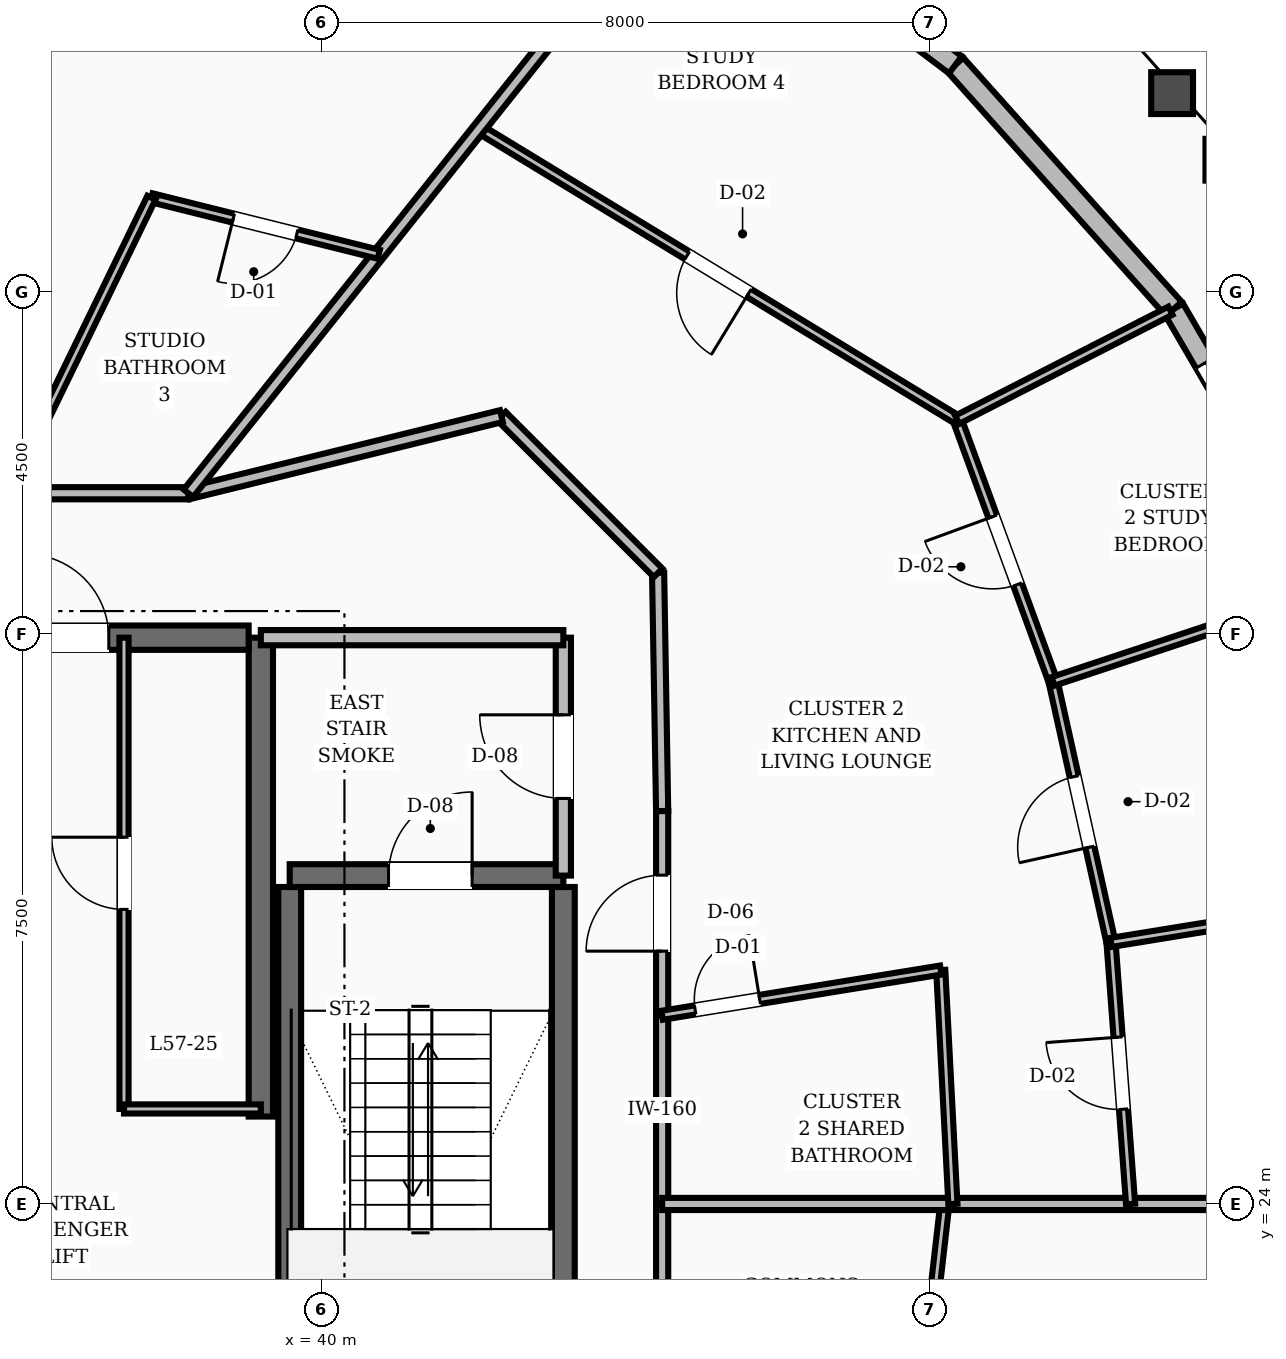
"""IFC4 building model, lengths in metres.
Left out: names, types, materials, properties, quantities, classifications, styles, units other than length and angle.
Written with IfcOpenShell. Run it as: python <this file> out.ifc"""

import sys

from ifc_helpers import new_model, si_unit, direction, frame, frame_2d, origin, place, context, subcontext, project, spatial, rectangle, extrude, element, fill, save


model = new_model("IFC4")
c1 = context("Model", 3, precision=1e-05, world=origin(), true_north=direction((0.0, 1.0)))
c2 = subcontext(c1, "Body", "Model", "MODEL_VIEW")
j1 = project(units=[si_unit("LENGTHUNIT", "METRE"), si_unit("PLANEANGLEUNIT", "RADIAN")], contexts=[c1])
p1 = place(None, origin())
s1 = spatial("IfcSite", under=j1, at=p1, CompositionType="ELEMENT")
p2 = place(p1, origin())
s2 = spatial("IfcBuilding", under=s1, at=p2, CompositionType="ELEMENT")
p3 = place(p2, frame((0.0, 0.0, 222.0)))
s3 = spatial("IfcBuildingStorey", under=s2, at=p3, CompositionType="ELEMENT", Elevation=222.0)
p4 = place(p3, frame((39.2, 25.15, 0.0), z_axis=(0.0, 0.0, 1.0), x_axis=(0.0, 1.0, 0.0)))
e1 = element("IfcWall", 1, at=p4, inside=s3, PredefinedType="SHEAR", context=c2, shape_type="SweptSolid", body=[
    extrude(rectangle(XDim=6.3, YDim=0.32, at=frame_2d((3.15, 0.0))), origin(), (0.0, 0.0, 1.0), 3.6),
])
p5 = place(p3, frame((35.8, 31.45, 0.0), z_axis=(0.0, 0.0, 1.0), x_axis=(1.0, 0.0, 0.0)))
e2 = element("IfcWall", 2, at=p5, inside=s3, PredefinedType="SHEAR", context=c2, shape_type="SweptSolid", body=[
    extrude(rectangle(XDim=3.24, YDim=0.32, at=frame_2d((1.62, 0.0))), origin(), (0.0, 0.0, 1.0), 3.6),
])
p6 = place(p5, frame((0.3, 0.0, 0.0)))
e3 = element("IfcOpeningElement", 3, at=p6, cuts=e2, PredefinedType="OPENING", context=c2, shape_type="SweptSolid", body=[
    extrude(rectangle(XDim=1.1, YDim=2.1, at=frame_2d((0.55, 1.05))), frame((0.0, 0.17, 0.0), z_axis=(0.0, -1.0, 0.0), x_axis=(1.0, 0.0, 0.0)), (0.0, 0.0, 1.0), 0.34),
])
for number, where, z_axis, x_axis in (
    (4, (43.18, 19.43, 0.0), (0.0, 0.0, 1.0), (0.0, 1.0, 0.0)),
    (5, (39.58, 19.43, 0.0), (0.0, 0.0, 1.0), (0.0, 1.0, 0.0)),
):
    element("IfcWall", number, at=place(p3, frame(where, z_axis=z_axis, x_axis=x_axis)), inside=s3, PredefinedType="SHEAR", context=c2, shape_type="SweptSolid", body=[
        extrude(rectangle(XDim=8.74, YDim=0.3, at=frame_2d((4.37, 0.0))), origin(), (0.0, 0.0, 1.0), 3.6),
    ])
p7 = place(p3, frame((39.58, 28.32, 0.0), z_axis=(0.0, 0.0, 1.0), x_axis=(1.0, 0.0, 0.0)))
e6 = element("IfcWall", 6, at=p7, inside=s3, PredefinedType="SHEAR", context=c2, shape_type="SweptSolid", body=[
    extrude(rectangle(XDim=3.6, YDim=0.3, at=frame_2d((1.8, 0.0))), origin(), (0.0, 0.0, 1.0), 3.6),
])
p8 = place(p7, frame((1.3, 0.0, 0.0)))
e7 = element("IfcOpeningElement", 7, at=p8, cuts=e6, PredefinedType="OPENING", context=c2, shape_type="SweptSolid", body=[
    extrude(rectangle(XDim=1.1, YDim=2.1, at=frame_2d((0.55, 1.05))), frame((0.0, 0.16, 0.0), z_axis=(0.0, -1.0, 0.0), x_axis=(1.0, 0.0, 0.0)), (0.0, 0.0, 1.0), 0.32),
])
p9 = place(p3, frame((53.347, 32.111, 0.0), z_axis=(0.0, 0.0, 1.0), x_axis=(-0.503498718903, 0.863995972249, 0.0)))
e8 = element("IfcWall", 8, at=p9, inside=s3, PredefinedType="STANDARD", context=c2, shape_type="SweptSolid", body=[
    extrude(rectangle(XDim=4.241, YDim=0.28, at=frame_2d((2.12, 0.0))), origin(), (0.0, 0.0, 1.0), 2.88),
])
p10 = place(p9, frame((0.821, 0.0, 0.8)))
e9 = element("IfcOpeningElement", 9, at=p10, cuts=e8, PredefinedType="OPENING", context=c2, shape_type="SweptSolid", body=[
    extrude(rectangle(XDim=2.6, YDim=1.65, at=frame_2d((1.3, 0.825))), frame((0.0, 0.15, 0.0), z_axis=(0.0, -1.0, 0.0), x_axis=(1.0, 0.0, 0.0)), (0.0, 0.0, 1.0), 0.3),
])
p11 = place(p3, frame((51.211, 35.775, 0.0), z_axis=(0.0, 0.0, 1.0), x_axis=(-0.666726962521, 0.745302057858, 0.0)))
e10 = element("IfcWall", 10, at=p11, inside=s3, PredefinedType="STANDARD", context=c2, shape_type="SweptSolid", body=[
    extrude(rectangle(XDim=4.31, YDim=0.28, at=frame_2d((2.155, 0.0))), origin(), (0.0, 0.0, 1.0), 2.88),
])
p12 = place(p3, frame((48.338, 38.987, 0.0), z_axis=(0.0, 0.0, 1.0), x_axis=(-0.798942565337, 0.601407330594, 0.0)))
e11 = element("IfcWall", 11, at=p12, inside=s3, PredefinedType="STANDARD", context=c2, shape_type="SweptSolid", body=[
    extrude(rectangle(XDim=4.383, YDim=0.28, at=frame_2d((2.191, 0.0))), origin(), (0.0, 0.0, 1.0), 2.88),
])
p13 = place(p12, frame((0.891, 0.0, 0.8)))
e12 = element("IfcOpeningElement", 12, at=p13, cuts=e11, PredefinedType="OPENING", context=c2, shape_type="SweptSolid", body=[
    extrude(rectangle(XDim=2.6, YDim=1.65, at=frame_2d((1.3, 0.825))), frame((0.0, 0.15, 0.0), z_axis=(0.0, -1.0, 0.0), x_axis=(1.0, 0.0, 0.0)), (0.0, 0.0, 1.0), 0.3),
])
p14 = place(p3, frame((43.18, 28.32, 0.0), z_axis=(0.0, 0.0, 1.0), x_axis=(0.0, 1.0, 0.0)))
e13 = element("IfcWall", 13, at=p14, inside=s3, PredefinedType="SOLIDWALL", context=c2, shape_type="SweptSolid", body=[
    extrude(rectangle(XDim=3.13, YDim=0.2, at=frame_2d((1.565, 0.0))), origin(), (0.0, 0.0, 1.0), 2.87),
])
p15 = place(p14, frame((1.015, 0.0, 0.0)))
e14 = element("IfcOpeningElement", 14, at=p15, cuts=e13, PredefinedType="OPENING", context=c2, shape_type="SweptSolid", body=[
    extrude(rectangle(XDim=1.1, YDim=2.1, at=frame_2d((0.55, 1.05))), frame((0.0, 0.11, 0.0), z_axis=(0.0, -1.0, 0.0), x_axis=(1.0, 0.0, 0.0)), (0.0, 0.0, 1.0), 0.22),
])
p16 = place(p3, frame((39.2, 31.45, 0.0), z_axis=(0.0, 0.0, 1.0), x_axis=(1.0, 0.0, 0.0)))
e15 = element("IfcWall", 15, at=p16, inside=s3, PredefinedType="SOLIDWALL", context=c2, shape_type="SweptSolid", body=[
    extrude(rectangle(XDim=3.98, YDim=0.2, at=frame_2d((1.99, 0.0))), origin(), (0.0, 0.0, 1.0), 2.87),
])
p17 = place(p3, frame((37.4, 25.25, 0.0), z_axis=(0.0, 0.0, 1.0), x_axis=(0.0, 1.0, 0.0)))
e16 = element("IfcWall", 16, at=p17, inside=s3, PredefinedType="PARTITIONING", context=c2, shape_type="SweptSolid", body=[
    extrude(rectangle(XDim=6.2, YDim=0.12, at=frame_2d((3.1, 0.0))), origin(), (0.0, 0.0, 1.0), 2.87),
])
p18 = place(p17, frame((2.625, 0.0, 0.0)))
e17 = element("IfcOpeningElement", 17, at=p18, cuts=e16, PredefinedType="OPENING", context=c2, shape_type="SweptSolid", body=[
    extrude(rectangle(XDim=0.95, YDim=2.1, at=frame_2d((0.475, 1.05))), frame((0.0, 0.07, 0.0), z_axis=(0.0, -1.0, 0.0), x_axis=(1.0, 0.0, 0.0)), (0.0, 0.0, 1.0), 0.14),
])
p19 = place(p3, frame((37.4, 25.25, 0.0), z_axis=(0.0, 0.0, 1.0), x_axis=(1.0, 0.0, 0.0)))
e18 = element("IfcWall", 18, at=p19, inside=s3, PredefinedType="PARTITIONING", context=c2, shape_type="SweptSolid", body=[
    extrude(rectangle(XDim=1.8, YDim=0.12, at=frame_2d((0.9, 0.0))), origin(), (0.0, 0.0, 1.0), 2.87),
])
p20 = place(p3, frame((44.48, 24.0, 0.0), z_axis=(0.0, 0.0, 1.0), x_axis=(0.0, 1.0, 0.0)))
e19 = element("IfcWall", 19, at=p20, inside=s3, PredefinedType="SOLIDWALL", context=c2, shape_type="SweptSolid", body=[
    extrude(rectangle(XDim=2.482, YDim=0.16, at=frame_2d((1.241, 0.0))), origin(), (0.0, 0.0, 1.0), 2.87),
])
p21 = place(p3, frame((44.48, 26.482, 0.0), z_axis=(0.0, 0.0, 1.0), x_axis=(0.0, 1.0, 0.0)))
e20 = element("IfcWall", 20, at=p21, inside=s3, PredefinedType="SOLIDWALL", context=c2, shape_type="SweptSolid", body=[
    extrude(rectangle(XDim=2.687, YDim=0.16, at=frame_2d((1.344, 0.0))), origin(), (0.0, 0.0, 1.0), 2.87),
])
p22 = place(p21, frame((0.844, 0.0, 0.0)))
e21 = element("IfcOpeningElement", 21, at=p22, cuts=e20, PredefinedType="OPENING", context=c2, shape_type="SweptSolid", body=[
    extrude(rectangle(XDim=1.0, YDim=2.1, at=frame_2d((0.5, 1.05))), frame((0.0, 0.09, 0.0), z_axis=(0.0, -1.0, 0.0), x_axis=(1.0, 0.0, 0.0)), (0.0, 0.0, 1.0), 0.18),
])
p23 = place(p3, frame((44.48, 29.169, 0.0), z_axis=(0.0, 0.0, 1.0), x_axis=(-0.016981035134, 0.999855811828, 0.0)))
e22 = element("IfcWall", 22, at=p23, inside=s3, PredefinedType="SOLIDWALL", context=c2, shape_type="SweptSolid", body=[
    extrude(rectangle(XDim=3.134, YDim=0.16, at=frame_2d((1.567, 0.0))), origin(), (0.0, 0.0, 1.0), 2.87),
])
p24 = place(p3, frame((44.427, 32.303, 0.0), z_axis=(0.0, 0.0, 1.0), x_axis=(-0.707106781187, 0.707106781187, 0.0)))
e23 = element("IfcWall", 23, at=p24, inside=s3, PredefinedType="SOLIDWALL", context=c2, shape_type="SweptSolid", body=[
    extrude(rectangle(XDim=2.916, YDim=0.16, at=frame_2d((1.458, 0.0))), origin(), (0.0, 0.0, 1.0), 2.87),
])
p25 = place(p3, frame((42.365, 34.365, 0.0), z_axis=(0.0, 0.0, 1.0), x_axis=(-0.970939799552, -0.239323850978, 0.0)))
e24 = element("IfcWall", 24, at=p25, inside=s3, PredefinedType="SOLIDWALL", context=c2, shape_type="SweptSolid", body=[
    extrude(rectangle(XDim=4.241, YDim=0.16, at=frame_2d((2.12, 0.0))), origin(), (0.0, 0.0, 1.0), 2.87),
])
p26 = place(p3, frame((38.248, 33.35, 0.0), z_axis=(0.0, 0.0, 1.0), x_axis=(-1.0, 0.0, 0.0)))
e25 = element("IfcWall", 25, at=p26, inside=s3, PredefinedType="SOLIDWALL", context=c2, shape_type="SweptSolid", body=[
    extrude(rectangle(XDim=2.375, YDim=0.16, at=frame_2d((1.188, 0.0))), origin(), (0.0, 0.0, 1.0), 2.87),
])
p27 = place(p3, frame((44.48, 21.518, 0.0), z_axis=(0.0, 0.0, 1.0), x_axis=(0.0, 1.0, 0.0)))
e26 = element("IfcWall", 26, at=p27, inside=s3, PredefinedType="SOLIDWALL", context=c2, shape_type="SweptSolid", body=[
    extrude(rectangle(XDim=2.482, YDim=0.16, at=frame_2d((1.241, 0.0))), origin(), (0.0, 0.0, 1.0), 2.87),
])
p28 = place(p3, frame((47.851, 20.978, 0.0), z_axis=(0.0, 0.0, 1.0), x_axis=(0.114270782561, 0.993449640522, 0.0)))
e27 = element("IfcWall", 27, at=p28, inside=s3, PredefinedType="PARTITIONING", context=c2, shape_type="SweptSolid", body=[
    extrude(rectangle(XDim=3.042, YDim=0.12, at=frame_2d((1.521, 0.0))), origin(), (0.0, 0.0, 1.0), 2.87),
])
p29 = place(p3, frame((44.48, 24.0, 0.0), z_axis=(0.0, 0.0, 1.0), x_axis=(1.0, 0.0, 0.0)))
e28 = element("IfcWall", 28, at=p29, inside=s3, PredefinedType="SOLIDWALL", context=c2, shape_type="SweptSolid", body=[
    extrude(rectangle(XDim=10.575, YDim=0.16, at=frame_2d((5.288, 0.0))), origin(), (0.0, 0.0, 1.0), 2.87),
])
p30 = place(p3, frame((48.305, 24.0, 0.0), z_axis=(0.0, 0.0, 1.0), x_axis=(-0.051893492217, 0.998652625023, 0.0)))
e29 = element("IfcWall", 29, at=p30, inside=s3, PredefinedType="PARTITIONING", context=c2, shape_type="SweptSolid", body=[
    extrude(rectangle(XDim=3.082, YDim=0.12, at=frame_2d((1.541, 0.0))), origin(), (0.0, 0.0, 1.0), 2.87),
])
p31 = place(p3, frame((44.48, 26.482, 0.0), z_axis=(0.0, 0.0, 1.0), x_axis=(0.98707991457, 0.160228718564, 0.0)))
e30 = element("IfcWall", 30, at=p31, inside=s3, PredefinedType="PARTITIONING", context=c2, shape_type="SweptSolid", body=[
    extrude(rectangle(XDim=3.713, YDim=0.12, at=frame_2d((1.857, 0.0))), origin(), (0.0, 0.0, 1.0), 2.87),
])
p32 = place(p31, frame((0.44, 0.0, 0.0)))
e31 = element("IfcOpeningElement", 31, at=p32, cuts=e30, PredefinedType="OPENING", context=c2, shape_type="SweptSolid", body=[
    extrude(rectangle(XDim=0.86, YDim=2.1, at=frame_2d((0.43, 1.05))), frame((0.0, 0.07, 0.0), z_axis=(0.0, -1.0, 0.0), x_axis=(1.0, 0.0, 0.0)), (0.0, 0.0, 1.0), 0.14),
])
p33 = place(p3, frame((50.643, 24.0, 0.0), z_axis=(0.0, 0.0, 1.0), x_axis=(-0.074645712609, 0.997210117071, 0.0)))
e32 = element("IfcWall", 32, at=p33, inside=s3, PredefinedType="PARTITIONING", context=c2, shape_type="SweptSolid", body=[
    extrude(rectangle(XDim=3.45, YDim=0.12, at=frame_2d((1.725, 0.0))), origin(), (0.0, 0.0, 1.0), 2.87),
])
p34 = place(p33, frame((1.25, 0.0, 0.0)))
e33 = element("IfcOpeningElement", 33, at=p34, cuts=e32, PredefinedType="OPENING", context=c2, shape_type="SweptSolid", body=[
    extrude(rectangle(XDim=0.95, YDim=2.1, at=frame_2d((0.475, 1.05))), frame((0.0, 0.07, 0.0), z_axis=(0.0, -1.0, 0.0), x_axis=(1.0, 0.0, 0.0)), (0.0, 0.0, 1.0), 0.14),
])
p35 = place(p3, frame((50.385, 27.441, 0.0), z_axis=(0.0, 0.0, 1.0), x_axis=(-0.216717372339, 0.976234388109, 0.0)))
e34 = element("IfcWall", 34, at=p35, inside=s3, PredefinedType="PARTITIONING", context=c2, shape_type="SweptSolid", body=[
    extrude(rectangle(XDim=3.518, YDim=0.12, at=frame_2d((1.759, 0.0))), origin(), (0.0, 0.0, 1.0), 2.87),
])
p36 = place(p35, frame((1.284, 0.0, 0.0)))
e35 = element("IfcOpeningElement", 35, at=p36, cuts=e34, PredefinedType="OPENING", context=c2, shape_type="SweptSolid", body=[
    extrude(rectangle(XDim=0.95, YDim=2.1, at=frame_2d((0.475, 1.05))), frame((0.0, 0.07, 0.0), z_axis=(0.0, -1.0, 0.0), x_axis=(1.0, 0.0, 0.0)), (0.0, 0.0, 1.0), 0.14),
])
p37 = place(p3, frame((50.385, 27.441, 0.0), z_axis=(0.0, 0.0, 1.0), x_axis=(0.987092082987, 0.160153737718, 0.0)))
e36 = element("IfcWall", 36, at=p37, inside=s3, PredefinedType="PARTITIONING", context=c2, shape_type="SweptSolid", body=[
    extrude(rectangle(XDim=4.282, YDim=0.12, at=frame_2d((2.141, 0.0))), origin(), (0.0, 0.0, 1.0), 2.87),
])
p38 = place(p3, frame((49.623, 30.875, 0.0), z_axis=(0.0, 0.0, 1.0), x_axis=(-0.344047173744, 0.938952364201, 0.0)))
e37 = element("IfcWall", 37, at=p38, inside=s3, PredefinedType="PARTITIONING", context=c2, shape_type="SweptSolid", body=[
    extrude(rectangle(XDim=3.665, YDim=0.12, at=frame_2d((1.833, 0.0))), origin(), (0.0, 0.0, 1.0), 2.87),
])
p39 = place(p38, frame((1.358, 0.0, 0.0)))
e38 = element("IfcOpeningElement", 38, at=p39, cuts=e37, PredefinedType="OPENING", context=c2, shape_type="SweptSolid", body=[
    extrude(rectangle(XDim=0.95, YDim=2.1, at=frame_2d((0.475, 1.05))), frame((0.0, 0.07, 0.0), z_axis=(0.0, -1.0, 0.0), x_axis=(1.0, 0.0, 0.0)), (0.0, 0.0, 1.0), 0.14),
])
p40 = place(p3, frame((49.623, 30.875, 0.0), z_axis=(0.0, 0.0, 1.0), x_axis=(0.949129842821, 0.314884965451, 0.0)))
e39 = element("IfcWall", 39, at=p40, inside=s3, PredefinedType="PARTITIONING", context=c2, shape_type="SweptSolid", body=[
    extrude(rectangle(XDim=3.874, YDim=0.12, at=frame_2d((1.937, 0.0))), origin(), (0.0, 0.0, 1.0), 2.87),
])
p41 = place(p3, frame((48.362, 34.317, 0.0), z_axis=(0.0, 0.0, 1.0), x_axis=(-0.854141598194, 0.520040508262, 0.0)))
e40 = element("IfcWall", 40, at=p41, inside=s3, PredefinedType="PARTITIONING", context=c2, shape_type="SweptSolid", body=[
    extrude(rectangle(XDim=7.367, YDim=0.12, at=frame_2d((3.684, 0.0))), origin(), (0.0, 0.0, 1.0), 2.87),
])
p42 = place(p41, frame((3.208, 0.0, 0.0)))
e41 = element("IfcOpeningElement", 41, at=p42, cuts=e40, PredefinedType="OPENING", context=c2, shape_type="SweptSolid", body=[
    extrude(rectangle(XDim=0.95, YDim=2.1, at=frame_2d((0.475, 1.05))), frame((0.0, 0.07, 0.0), z_axis=(0.0, -1.0, 0.0), x_axis=(1.0, 0.0, 0.0)), (0.0, 0.0, 1.0), 0.14),
])
p43 = place(p3, frame((48.362, 34.317, 0.0), z_axis=(0.0, 0.0, 1.0), x_axis=(0.890235742067, 0.455500080732, 0.0)))
e42 = element("IfcWall", 42, at=p43, inside=s3, PredefinedType="PARTITIONING", context=c2, shape_type="SweptSolid", body=[
    extrude(rectangle(XDim=3.151, YDim=0.12, at=frame_2d((1.576, 0.0))), origin(), (0.0, 0.0, 1.0), 2.87),
])
p44 = place(p3, frame((38.248, 33.35, 0.0), z_axis=(0.0, 0.0, 1.0), x_axis=(0.623021929745, 0.782204369112, 0.0)))
e43 = element("IfcWall", 43, at=p44, inside=s3, PredefinedType="SOLIDWALL", context=c2, shape_type="SweptSolid", body=[
    extrude(rectangle(XDim=10.526, YDim=0.16, at=frame_2d((5.263, 0.0))), origin(), (0.0, 0.0, 1.0), 2.87),
])
p45 = place(p3, frame((40.751, 36.494, 0.0), z_axis=(0.0, 0.0, 1.0), x_axis=(-0.97040292974, 0.241491519419, 0.0)))
e44 = element("IfcWall", 44, at=p45, inside=s3, PredefinedType="PARTITIONING", context=c2, shape_type="SweptSolid", body=[
    extrude(rectangle(XDim=3.082, YDim=0.12, at=frame_2d((1.541, 0.0))), origin(), (0.0, 0.0, 1.0), 2.87),
])
p46 = place(p45, frame((1.111, 0.0, 0.0)))
e45 = element("IfcOpeningElement", 45, at=p46, cuts=e44, PredefinedType="OPENING", context=c2, shape_type="SweptSolid", body=[
    extrude(rectangle(XDim=0.86, YDim=2.1, at=frame_2d((0.43, 1.05))), frame((0.0, 0.07, 0.0), z_axis=(0.0, -1.0, 0.0), x_axis=(1.0, 0.0, 0.0)), (0.0, 0.0, 1.0), 0.14),
])
p47 = place(p3, frame((35.873, 33.35, 0.0), z_axis=(0.0, 0.0, 1.0), x_axis=(0.43692616188, 0.899497375796, 0.0)))
e46 = element("IfcWall", 46, at=p47, inside=s3, PredefinedType="PARTITIONING", context=c2, shape_type="SweptSolid", body=[
    extrude(rectangle(XDim=4.322, YDim=0.12, at=frame_2d((2.161, 0.0))), origin(), (0.0, 0.0, 1.0), 2.87),
])
p48 = place(p10, origin())
e47 = element("IfcWindow", 47, at=p48, inside=s3, PartitioningType="SINGLE_PANEL", PredefinedType="WINDOW", context=c2, shape_type="SweptSolid", body=[
    extrude(rectangle(XDim=2.6, YDim=1.65, at=frame_2d((1.3, 0.825))), frame((0.0, 0.03, 0.0), z_axis=(0.0, -1.0, 0.0), x_axis=(1.0, 0.0, 0.0)), (0.0, 0.0, 1.0), 0.06),
])
fill(e9, e47)
p49 = place(p8, origin())
e48 = element("IfcDoor", 48, at=p49, inside=s3, OperationType="SINGLE_SWING_RIGHT", PredefinedType="DOOR", context=c2, shape_type="SweptSolid", body=[
    extrude(rectangle(XDim=1.1, YDim=2.1, at=frame_2d((0.55, 1.05))), frame((0.0, 0.025, 0.0), z_axis=(0.0, -1.0, 0.0), x_axis=(1.0, 0.0, 0.0)), (0.0, 0.0, 1.0), 0.05),
])
fill(e7, e48)
p50 = place(p15, origin())
e49 = element("IfcDoor", 49, at=p50, inside=s3, OperationType="SINGLE_SWING_RIGHT", PredefinedType="DOOR", context=c2, shape_type="SweptSolid", body=[
    extrude(rectangle(XDim=1.1, YDim=2.1, at=frame_2d((0.55, 1.05))), frame((0.0, 0.025, 0.0), z_axis=(0.0, -1.0, 0.0), x_axis=(1.0, 0.0, 0.0)), (0.0, 0.0, 1.0), 0.05),
])
fill(e14, e49)
p51 = place(p6, origin())
e50 = element("IfcDoor", 50, at=p51, inside=s3, OperationType="SINGLE_SWING_LEFT", PredefinedType="DOOR", context=c2, shape_type="SweptSolid", body=[
    extrude(rectangle(XDim=1.1, YDim=2.1, at=frame_2d((0.55, 1.05))), frame((0.0, 0.025, 0.0), z_axis=(0.0, -1.0, 0.0), x_axis=(1.0, 0.0, 0.0)), (0.0, 0.0, 1.0), 0.05),
])
fill(e3, e50)
p52 = place(p18, origin())
e51 = element("IfcDoor", 51, at=p52, inside=s3, OperationType="SINGLE_SWING_RIGHT", PredefinedType="DOOR", context=c2, shape_type="SweptSolid", body=[
    extrude(rectangle(XDim=0.95, YDim=2.1, at=frame_2d((0.475, 1.05))), frame((0.0, 0.025, 0.0), z_axis=(0.0, -1.0, 0.0), x_axis=(1.0, 0.0, 0.0)), (0.0, 0.0, 1.0), 0.05),
])
fill(e17, e51)
p53 = place(p32, origin())
e52 = element("IfcDoor", 52, at=p53, inside=s3, OperationType="SINGLE_SWING_RIGHT", PredefinedType="DOOR", context=c2, shape_type="SweptSolid", body=[
    extrude(rectangle(XDim=0.86, YDim=2.1, at=frame_2d((0.43, 1.05))), frame((0.0, 0.025, 0.0), z_axis=(0.0, -1.0, 0.0), x_axis=(1.0, 0.0, 0.0)), (0.0, 0.0, 1.0), 0.05),
])
fill(e31, e52)
p54 = place(p22, origin())
e53 = element("IfcDoor", 53, at=p54, inside=s3, OperationType="SINGLE_SWING_LEFT", PredefinedType="DOOR", context=c2, shape_type="SweptSolid", body=[
    extrude(rectangle(XDim=1.0, YDim=2.1, at=frame_2d((0.5, 1.05))), frame((0.0, 0.025, 0.0), z_axis=(0.0, -1.0, 0.0), x_axis=(1.0, 0.0, 0.0)), (0.0, 0.0, 1.0), 0.05),
])
fill(e21, e53)
p55 = place(p34, origin())
e54 = element("IfcDoor", 54, at=p55, inside=s3, OperationType="SINGLE_SWING_RIGHT", PredefinedType="DOOR", context=c2, shape_type="SweptSolid", body=[
    extrude(rectangle(XDim=0.95, YDim=2.1, at=frame_2d((0.475, 1.05))), frame((0.0, 0.025, 0.0), z_axis=(0.0, -1.0, 0.0), x_axis=(1.0, 0.0, 0.0)), (0.0, 0.0, 1.0), 0.05),
])
fill(e33, e54)
p56 = place(p36, origin())
e55 = element("IfcDoor", 55, at=p56, inside=s3, OperationType="SINGLE_SWING_LEFT", PredefinedType="DOOR", context=c2, shape_type="SweptSolid", body=[
    extrude(rectangle(XDim=0.95, YDim=2.1, at=frame_2d((0.475, 1.05))), frame((0.0, 0.025, 0.0), z_axis=(0.0, -1.0, 0.0), x_axis=(1.0, 0.0, 0.0)), (0.0, 0.0, 1.0), 0.05),
])
fill(e35, e55)
p57 = place(p39, origin())
e56 = element("IfcDoor", 56, at=p57, inside=s3, OperationType="SINGLE_SWING_RIGHT", PredefinedType="DOOR", context=c2, shape_type="SweptSolid", body=[
    extrude(rectangle(XDim=0.95, YDim=2.1, at=frame_2d((0.475, 1.05))), frame((0.0, 0.025, 0.0), z_axis=(0.0, -1.0, 0.0), x_axis=(1.0, 0.0, 0.0)), (0.0, 0.0, 1.0), 0.05),
])
fill(e38, e56)
p58 = place(p42, origin())
e57 = element("IfcDoor", 57, at=p58, inside=s3, OperationType="SINGLE_SWING_LEFT", PredefinedType="DOOR", context=c2, shape_type="SweptSolid", body=[
    extrude(rectangle(XDim=0.95, YDim=2.1, at=frame_2d((0.475, 1.05))), frame((0.0, 0.025, 0.0), z_axis=(0.0, -1.0, 0.0), x_axis=(1.0, 0.0, 0.0)), (0.0, 0.0, 1.0), 0.05),
])
fill(e41, e57)
p59 = place(p46, origin())
e58 = element("IfcDoor", 58, at=p59, inside=s3, OperationType="SINGLE_SWING_RIGHT", PredefinedType="DOOR", context=c2, shape_type="SweptSolid", body=[
    extrude(rectangle(XDim=0.86, YDim=2.1, at=frame_2d((0.43, 1.05))), frame((0.0, 0.025, 0.0), z_axis=(0.0, -1.0, 0.0), x_axis=(1.0, 0.0, 0.0)), (0.0, 0.0, 1.0), 0.05),
])
fill(e45, e58)
save(model, sys.argv[1])
